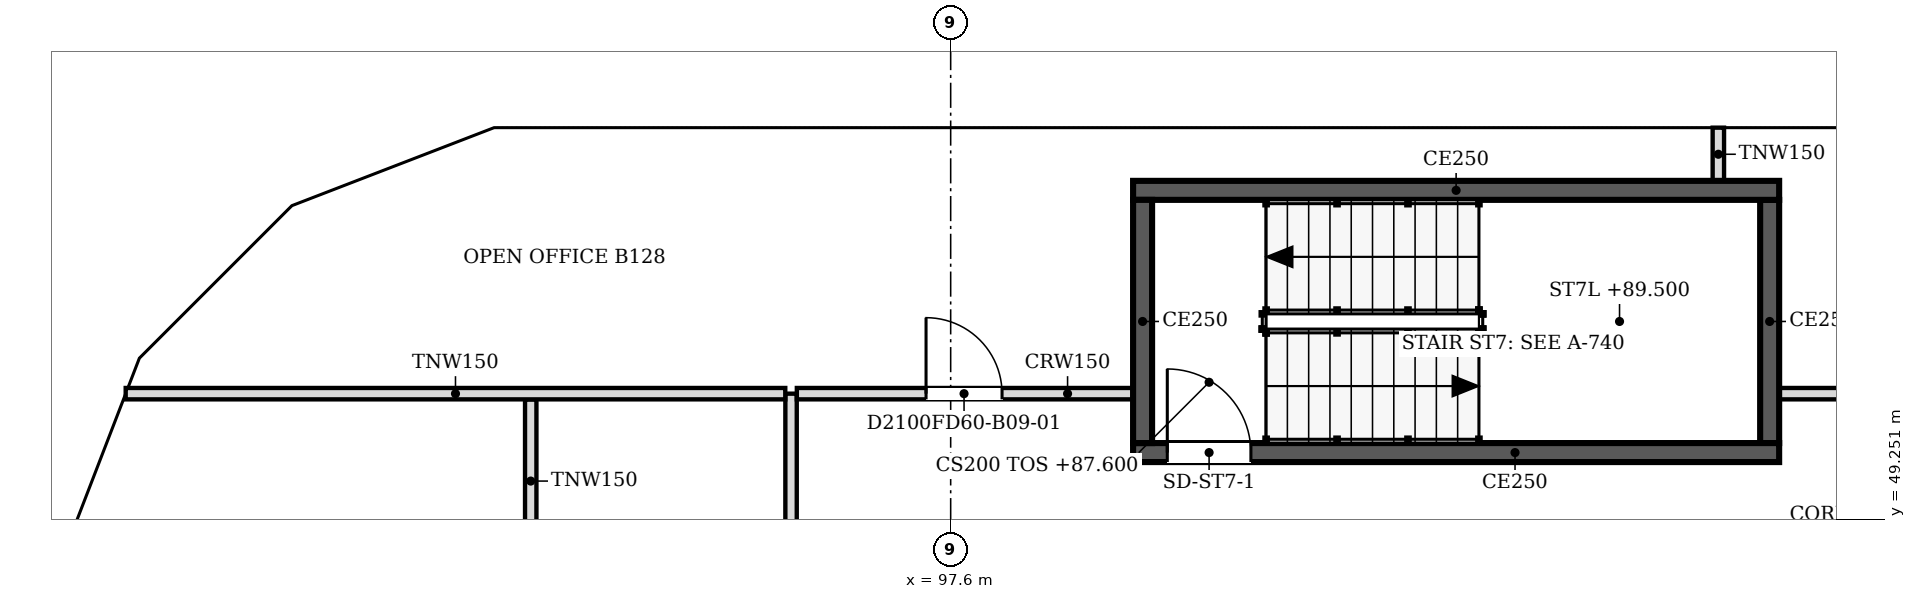
"""IFC4 building model, lengths in metres.
Left out: names, types, materials, properties, quantities, classifications, styles, units other than length and angle.
Written with IfcOpenShell. Run it as: python <this file> out.ifc"""

import sys

from ifc_helpers import new_model, si_unit, direction, frame, frame_2d, origin, place, context, subcontext, project, spatial, polyline, rectangle, outline, extrude, faceted_brep, source, transform, mapped, element, fill, save


model = new_model("IFC4")
c1 = context("Model", 3, precision=1e-05, world=origin(), true_north=direction((0.0, 1.0)))
c2 = subcontext(c1, "Body", "Model", "MODEL_VIEW")
j1 = project(units=[si_unit("LENGTHUNIT", "METRE"), si_unit("PLANEANGLEUNIT", "RADIAN")], contexts=[c1])
p1 = place(None, origin())
s1 = spatial("IfcSite", under=j1, at=p1, CompositionType="ELEMENT")
p2 = place(p1, origin())
s2 = spatial("IfcBuilding", under=s1, at=p2, CompositionType="ELEMENT")
p3 = place(p2, frame((0.0, 0.0, 87.6)))
s3 = spatial("IfcBuildingStorey", under=s2, at=p3, CompositionType="ELEMENT", Elevation=87.6)
m1 = source(origin(), c2, "Body", "SweptSolid", [
    extrude(outline(polyline([(3.05, 0.0), (6.1, 3.8), (3.05, 7.6), (0.0, 3.8), (3.05, 0.0)])), frame((0.0, 0.25, 0.0), z_axis=(0.0, -1.0, 0.0), x_axis=(1.0, 0.0, 0.0)), (0.0, 0.0, 1.0), 0.5),
])
p4 = place(p3, frame((109.8, 54.65, -3.8), z_axis=(0.0, 0.0, 1.0), x_axis=(-1.0, 0.0, 0.0)))
e1 = element("IfcWall", 1, at=p4, inside=s3, PredefinedType="SOLIDWALL", context=c2, shape_type="MappedRepresentation", body=[
    mapped(m1, transform((0.0, 0.0, 0.0), scale=1.0)),
])
m2 = source(origin(), c2, "Body", "SweptSolid", [
    extrude(outline(polyline([(3.05, 0.399), (5.78, 3.8), (3.05, 7.2), (0.321, 3.8), (3.05, 0.399)])), frame((0.0, 0.26, 0.0), z_axis=(0.0, -1.0, 0.0), x_axis=(1.0, 0.0, 0.0)), (0.0, 0.0, 1.0), 0.52),
])
p5 = place(p4, origin())
e2 = element("IfcOpeningElement", 2, at=p5, cuts=e1, PredefinedType="OPENING", context=c2, shape_type="MappedRepresentation", body=[
    mapped(m2, transform((0.0, 0.0, 0.0), scale=1.0)),
])
m3 = source(origin(), c2, "Body", "Brep", [
    faceted_brep([(3.05, -0.25, 0.0), (6.1, -0.25, 3.8), (6.1, -0.25, 3.8), (3.05, -0.25, 7.6), (0.0, -0.25, 3.8), (0.0, 0.25, 3.8), (3.05, 0.25, 7.6), (6.1, 0.25, 3.8), (6.1, 0.25, 3.8), (3.05, 0.25, 0.0)], [[[0, 1, 2, 3, 4]], [[5, 6, 7, 8, 9]], [[9, 8, 1, 0]], [[7, 6, 3, 2]], [[6, 5, 4, 3]], [[5, 9, 0, 4]], [[1, 8, 7, 2]]]),
])
p6 = place(p3, frame((103.7, 54.65, -3.8), z_axis=(0.0, 0.0, 1.0), x_axis=(-1.0, 0.0, 0.0)))
e3 = element("IfcWall", 3, at=p6, inside=s3, PredefinedType="SOLIDWALL", context=c2, shape_type="MappedRepresentation", body=[
    mapped(m3, transform((0.0, 0.0, 0.0), scale=1.0)),
])
p7 = place(p6, origin())
e4 = element("IfcOpeningElement", 4, at=p7, cuts=e3, PredefinedType="OPENING", context=c2, shape_type="MappedRepresentation", body=[
    mapped(m2, transform((0.0, 0.0, 0.0), scale=1.0)),
])
m4 = source(origin(), c2, "Body", "Brep", [
    faceted_brep([(3.05, -0.25, 0.0), (6.053, -0.25, 3.8), (3.05, -0.25, 7.6), (0.0, -0.25, 3.8), (0.0, 0.25, 3.8), (3.05, 0.25, 7.6), (6.007, 0.25, 3.859), (6.007, 0.25, 3.741), (3.05, 0.25, 0.0), (6.053, 0.0, 3.8)], [[[0, 1, 2, 3]], [[4, 5, 6, 7, 8]], [[8, 7, 9, 1, 0]], [[6, 5, 2, 1, 9]], [[5, 4, 3, 2]], [[4, 8, 0, 3]], [[7, 6, 9]]]),
])
p8 = place(p3, frame((97.6, 54.65, -3.8), z_axis=(0.0, 0.0, 1.0), x_axis=(-1.0, 0.0, 0.0)))
e5 = element("IfcWall", 5, at=p8, inside=s3, PredefinedType="SOLIDWALL", context=c2, shape_type="MappedRepresentation", body=[
    mapped(m4, transform((0.0, 0.0, 0.0), scale=1.0)),
])
m5 = source(origin(), c2, "Body", "SweptSolid", [
    extrude(outline(polyline([(3.049, 0.401), (5.735, 3.8), (3.049, 7.199), (0.321, 3.8), (3.049, 0.401)])), frame((0.0, 0.26, 0.0), z_axis=(0.0, -1.0, 0.0), x_axis=(1.0, 0.0, 0.0)), (0.0, 0.0, 1.0), 0.52),
])
p9 = place(p8, origin())
e6 = element("IfcOpeningElement", 6, at=p9, cuts=e5, PredefinedType="OPENING", context=c2, shape_type="MappedRepresentation", body=[
    mapped(m5, transform((0.0, 0.0, 0.0), scale=1.0)),
])
m6 = source(origin(), c2, "Body", "Brep", [
    faceted_brep([(2.95, -0.25, 0.0), (3.003, -0.25, 0.068), (3.003, -0.25, 7.531), (2.95, -0.25, 7.6), (0.0, -0.25, 3.8), (0.047, 0.25, 3.86), (2.898, 0.25, 7.532), (2.898, 0.25, 0.068), (0.047, 0.25, 3.74), (2.95, 0.0, 0.0), (2.95, 0.0, 7.6), (0.0, 0.0, 3.8)], [[[0, 1, 2, 3, 4]], [[5, 6, 7, 8]], [[1, 0, 9]], [[10, 3, 2]], [[6, 5, 11, 4, 3, 10]], [[8, 7, 9, 0, 4, 11]], [[8, 11, 5]], [[1, 9, 7, 6, 10, 2]]]),
])
p10 = place(p3, frame((91.547, 54.65, -3.8), z_axis=(0.0, 0.0, 1.0), x_axis=(-0.933007896601, -0.359855894603, 0.0)))
e7 = element("IfcWall", 7, at=p10, inside=s3, PredefinedType="SOLIDWALL", context=c2, shape_type="MappedRepresentation", body=[
    mapped(m6, transform((0.0, 0.0, 0.0), scale=1.0)),
])
m7 = source(origin(), c2, "Body", "SweptSolid", [
    extrude(outline(polyline([(2.75, 6.935), (0.316, 3.8), (2.75, 0.665), (2.75, 6.935)])), frame((0.0, 0.26, 0.0), z_axis=(0.0, -1.0, 0.0), x_axis=(1.0, 0.0, 0.0)), (0.0, 0.0, 1.0), 0.52),
])
p11 = place(p10, origin())
e8 = element("IfcOpeningElement", 8, at=p11, cuts=e7, PredefinedType="OPENING", context=c2, shape_type="MappedRepresentation", body=[
    mapped(m7, transform((0.0, 0.0, 0.0), scale=1.0)),
])
m8 = source(origin(), c2, "Body", "Brep", [
    faceted_brep([(0.053, -0.25, 0.0), (2.997, -0.25, 3.8), (0.053, -0.25, 7.6), (0.0, -0.25, 7.532), (0.0, -0.25, 0.068), (0.106, 0.25, 7.531), (2.944, 0.25, 3.868), (2.944, 0.25, 3.732), (0.106, 0.25, 0.068), (2.997, 0.0, 3.8), (0.053, 0.0, 0.0), (0.053, 0.0, 7.6)], [[[0, 1, 2, 3, 4]], [[5, 6, 7, 8]], [[8, 7, 9, 1, 0, 10]], [[6, 5, 11, 2, 1, 9]], [[3, 2, 11]], [[10, 0, 4]], [[8, 10, 4, 3, 11, 5]], [[7, 6, 9]]]),
])
p12 = place(p3, frame((88.831, 53.625, -3.8), z_axis=(0.0, 0.0, 1.0), x_axis=(-0.707147509625, -0.707066050402, 0.0)))
e9 = element("IfcWall", 9, at=p12, inside=s3, PredefinedType="SOLIDWALL", context=c2, shape_type="MappedRepresentation", body=[
    mapped(m8, transform((0.0, 0.0, 0.0), scale=1.0)),
])
m9 = source(origin(), c2, "Body", "SweptSolid", [
    extrude(outline(polyline([(0.253, 0.666), (2.681, 3.8), (0.253, 6.934), (0.253, 0.666)])), frame((0.0, 0.26, 0.0), z_axis=(0.0, -1.0, 0.0), x_axis=(1.0, 0.0, 0.0)), (0.0, 0.0, 1.0), 0.52),
])
p13 = place(p12, origin())
e10 = element("IfcOpeningElement", 10, at=p13, cuts=e9, PredefinedType="OPENING", context=c2, shape_type="MappedRepresentation", body=[
    mapped(m9, transform((0.0, 0.0, 0.0), scale=1.0)),
])
m10 = source(origin(), c2, "Body", "Brep", [
    faceted_brep([(2.95, -0.25, 0.0), (2.997, -0.25, 0.059), (2.997, -0.25, 7.541), (2.95, -0.25, 7.6), (0.0, -0.25, 3.8), (0.053, 0.25, 3.868), (2.904, 0.25, 7.54), (2.904, 0.25, 0.06), (0.053, 0.25, 3.732), (2.95, 0.0, 0.0), (2.95, 0.0, 7.6), (0.0, 0.0, 3.8)], [[[0, 1, 2, 3, 4]], [[5, 6, 7, 8]], [[1, 0, 9]], [[10, 3, 2]], [[6, 5, 11, 4, 3, 10]], [[8, 7, 9, 0, 4, 11]], [[8, 11, 5]], [[1, 9, 7, 6, 10, 2]]]),
])
p14 = place(p3, frame((86.712, 51.506, -3.8), z_axis=(0.0, 0.0, 1.0), x_axis=(-0.359874094142, -0.933000876937, 0.0)))
e11 = element("IfcWall", 11, at=p14, inside=s3, PredefinedType="SOLIDWALL", context=c2, shape_type="MappedRepresentation", body=[
    mapped(m10, transform((0.0, 0.0, 0.0), scale=1.0)),
])
p15 = place(p14, origin())
e12 = element("IfcOpeningElement", 12, at=p15, cuts=e11, PredefinedType="OPENING", context=c2, shape_type="MappedRepresentation", body=[
    mapped(m7, transform((0.0, 0.0, 0.0), scale=1.0)),
])
p16 = place(p2, frame((0.0, 0.0, 91.4)))
s4 = spatial("IfcBuildingStorey", under=s2, at=p16, CompositionType="ELEMENT", Elevation=91.4)
m11 = source(origin(), c2, "Body", "SweptSolid", [
    extrude(outline(polyline([(3.05, 0.0), (6.1, 3.8), (3.05, 7.6), (0.0, 3.8), (3.05, 0.0)])), frame((0.0, 0.25, 0.0), z_axis=(0.0, -1.0, 0.0), x_axis=(1.0, 0.0, 0.0)), (0.0, 0.0, 1.0), 0.5),
])
p17 = place(p16, frame((112.85, 54.65, -3.8), z_axis=(0.0, 0.0, 1.0), x_axis=(-1.0, 0.0, 0.0)))
e13 = element("IfcWall", 13, at=p17, inside=s4, PredefinedType="SOLIDWALL", context=c2, shape_type="MappedRepresentation", body=[
    mapped(m11, transform((0.0, 0.0, 0.0), scale=1.0)),
])
m12 = source(origin(), c2, "Body", "SweptSolid", [
    extrude(outline(polyline([(3.05, 0.399), (5.78, 3.8), (3.05, 7.2), (0.321, 3.8), (3.05, 0.399)])), frame((0.0, 0.26, 0.0), z_axis=(0.0, -1.0, 0.0), x_axis=(1.0, 0.0, 0.0)), (0.0, 0.0, 1.0), 0.52),
])
p18 = place(p17, origin())
e14 = element("IfcOpeningElement", 14, at=p18, cuts=e13, PredefinedType="OPENING", context=c2, shape_type="MappedRepresentation", body=[
    mapped(m12, transform((0.0, 0.0, 0.0), scale=1.0)),
])
p19 = place(p16, frame((106.75, 54.65, -3.8), z_axis=(0.0, 0.0, 1.0), x_axis=(-1.0, 0.0, 0.0)))
e15 = element("IfcWall", 15, at=p19, inside=s4, PredefinedType="SOLIDWALL", context=c2, shape_type="MappedRepresentation", body=[
    mapped(m11, transform((0.0, 0.0, 0.0), scale=1.0)),
])
p20 = place(p19, origin())
e16 = element("IfcOpeningElement", 16, at=p20, cuts=e15, PredefinedType="OPENING", context=c2, shape_type="MappedRepresentation", body=[
    mapped(m12, transform((0.0, 0.0, 0.0), scale=1.0)),
])
m13 = source(origin(), c2, "Body", "Brep", [
    faceted_brep([(3.05, -0.25, 0.0), (6.1, -0.25, 3.8), (6.1, -0.25, 3.8), (3.05, -0.25, 7.6), (0.0, -0.25, 3.8), (0.0, 0.25, 3.8), (3.05, 0.25, 7.6), (6.1, 0.25, 3.8), (6.1, 0.25, 3.8), (3.05, 0.25, 0.0)], [[[0, 1, 2, 3, 4]], [[5, 6, 7, 8, 9]], [[9, 8, 1, 0]], [[7, 6, 3, 2]], [[6, 5, 4, 3]], [[5, 9, 0, 4]], [[1, 8, 7, 2]]]),
])
p21 = place(p16, frame((100.65, 54.65, -3.8), z_axis=(0.0, 0.0, 1.0), x_axis=(-1.0, 0.0, 0.0)))
e17 = element("IfcWall", 17, at=p21, inside=s4, PredefinedType="SOLIDWALL", context=c2, shape_type="MappedRepresentation", body=[
    mapped(m13, transform((0.0, 0.0, 0.0), scale=1.0)),
])
p22 = place(p21, origin())
e18 = element("IfcOpeningElement", 18, at=p22, cuts=e17, PredefinedType="OPENING", context=c2, shape_type="MappedRepresentation", body=[
    mapped(m12, transform((0.0, 0.0, 0.0), scale=1.0)),
])
m14 = source(origin(), c2, "Body", "Brep", [
    faceted_brep([(3.003, -0.25, 0.0), (3.05, -0.25, 0.06), (3.05, -0.25, 7.54), (3.003, -0.25, 7.6), (0.0, -0.25, 3.8), (0.0, 0.25, 3.8), (2.957, 0.25, 7.541), (2.957, 0.25, 0.059), (3.003, 0.0, 0.0), (3.003, 0.0, 7.6)], [[[0, 1, 2, 3, 4]], [[5, 6, 7]], [[1, 0, 8]], [[9, 3, 2]], [[6, 5, 4, 3, 9]], [[5, 7, 8, 0, 4]], [[1, 8, 7, 6, 9, 2]]]),
])
p23 = place(p16, frame((94.55, 54.65, -3.8), z_axis=(0.0, 0.0, 1.0), x_axis=(-1.0, 0.0, 0.0)))
e19 = element("IfcWall", 19, at=p23, inside=s4, PredefinedType="SOLIDWALL", context=c2, shape_type="MappedRepresentation", body=[
    mapped(m14, transform((0.0, 0.0, 0.0), scale=1.0)),
])
m15 = source(origin(), c2, "Body", "SweptSolid", [
    extrude(outline(polyline([(2.803, 6.944), (0.319, 3.8), (2.803, 0.656), (2.803, 6.944)])), frame((0.0, 0.26, 0.0), z_axis=(0.0, -1.0, 0.0), x_axis=(1.0, 0.0, 0.0)), (0.0, 0.0, 1.0), 0.52),
])
p24 = place(p23, origin())
e20 = element("IfcOpeningElement", 20, at=p24, cuts=e19, PredefinedType="OPENING", context=c2, shape_type="MappedRepresentation", body=[
    mapped(m15, transform((0.0, 0.0, 0.0), scale=1.0)),
])
m16 = source(origin(), c2, "Body", "Brep", [
    faceted_brep([(0.047, -0.25, 0.0), (2.997, -0.25, 3.8), (0.047, -0.25, 7.6), (0.0, -0.25, 7.541), (0.0, -0.25, 0.059), (0.093, 0.25, 7.54), (2.944, 0.25, 3.868), (2.944, 0.25, 3.732), (0.093, 0.25, 0.06), (2.997, 0.0, 3.8), (0.047, 0.0, 0.0), (0.047, 0.0, 7.6)], [[[0, 1, 2, 3, 4]], [[5, 6, 7, 8]], [[8, 7, 9, 1, 0, 10]], [[6, 5, 11, 2, 1, 9]], [[3, 2, 11]], [[10, 0, 4]], [[8, 10, 4, 3, 11, 5]], [[9, 7, 6]]]),
])
p25 = place(p16, frame((91.59, 54.667, -3.8), z_axis=(0.0, 0.0, 1.0), x_axis=(-0.933000876937, -0.359874094142, 0.0)))
e21 = element("IfcWall", 21, at=p25, inside=s4, PredefinedType="SOLIDWALL", context=c2, shape_type="MappedRepresentation", body=[
    mapped(m16, transform((0.0, 0.0, 0.0), scale=1.0)),
])
m17 = source(origin(), c2, "Body", "SweptSolid", [
    extrude(outline(polyline([(0.247, 0.665), (2.681, 3.8), (0.247, 6.935), (0.247, 0.665)])), frame((0.0, 0.26, 0.0), z_axis=(0.0, -1.0, 0.0), x_axis=(1.0, 0.0, 0.0)), (0.0, 0.0, 1.0), 0.52),
])
p26 = place(p25, origin())
e22 = element("IfcOpeningElement", 22, at=p26, cuts=e21, PredefinedType="OPENING", context=c2, shape_type="MappedRepresentation", body=[
    mapped(m17, transform((0.0, 0.0, 0.0), scale=1.0)),
])
m18 = source(origin(), c2, "Body", "Brep", [
    faceted_brep([(2.944, -0.25, 0.0), (2.997, -0.25, 0.068), (2.997, -0.25, 7.532), (2.944, -0.25, 7.6), (0.0, -0.25, 3.8), (0.053, 0.25, 3.868), (2.891, 0.25, 7.532), (2.891, 0.25, 0.068), (0.053, 0.25, 3.731), (2.944, 0.0, 0.0), (2.944, 0.0, 7.6), (0.0, 0.0, 3.8)], [[[0, 1, 2, 3, 4]], [[5, 6, 7, 8]], [[1, 0, 9]], [[10, 3, 2]], [[6, 5, 11, 4, 3, 10]], [[8, 7, 9, 0, 4, 11]], [[8, 11, 5]], [[1, 9, 7, 6, 10, 2]]]),
])
p27 = place(p16, frame((88.794, 53.588, -3.8), z_axis=(0.0, 0.0, 1.0), x_axis=(-0.707066050402, -0.707147509625, 0.0)))
e23 = element("IfcWall", 23, at=p27, inside=s4, PredefinedType="SOLIDWALL", context=c2, shape_type="MappedRepresentation", body=[
    mapped(m18, transform((0.0, 0.0, 0.0), scale=1.0)),
])
m19 = source(origin(), c2, "Body", "SweptSolid", [
    extrude(outline(polyline([(2.744, 6.934), (0.316, 3.8), (2.744, 0.666), (2.744, 6.934)])), frame((0.0, 0.26, 0.0), z_axis=(0.0, -1.0, 0.0), x_axis=(1.0, 0.0, 0.0)), (0.0, 0.0, 1.0), 0.52),
])
p28 = place(p27, origin())
e24 = element("IfcOpeningElement", 24, at=p28, cuts=e23, PredefinedType="OPENING", context=c2, shape_type="MappedRepresentation", body=[
    mapped(m19, transform((0.0, 0.0, 0.0), scale=1.0)),
])
m20 = source(origin(), c2, "Body", "Brep", [
    faceted_brep([(0.053, -0.25, 0.0), (3.003, -0.25, 3.8), (0.053, -0.25, 7.6), (0.0, -0.25, 7.531), (0.0, -0.25, 0.068), (0.106, 0.25, 7.532), (2.957, 0.25, 3.86), (2.957, 0.25, 3.74), (0.106, 0.25, 0.068), (3.003, 0.0, 3.8), (0.053, 0.0, 0.0), (0.053, 0.0, 7.6)], [[[0, 1, 2, 3, 4]], [[5, 6, 7, 8]], [[8, 7, 9, 1, 0, 10]], [[6, 5, 11, 2, 1, 9]], [[3, 2, 11]], [[10, 0, 4]], [[8, 10, 4, 3, 11, 5]], [[9, 7, 6]]]),
])
p29 = place(p16, frame((86.731, 51.556, -3.8), z_axis=(0.0, 0.0, 1.0), x_axis=(-0.359855894603, -0.933007896601, 0.0)))
e25 = element("IfcWall", 25, at=p29, inside=s4, PredefinedType="SOLIDWALL", context=c2, shape_type="MappedRepresentation", body=[
    mapped(m20, transform((0.0, 0.0, 0.0), scale=1.0)),
])
m21 = source(origin(), c2, "Body", "SweptSolid", [
    extrude(outline(polyline([(0.253, 0.665), (2.687, 3.8), (0.253, 6.935), (0.253, 0.665)])), frame((0.0, 0.26, 0.0), z_axis=(0.0, -1.0, 0.0), x_axis=(1.0, 0.0, 0.0)), (0.0, 0.0, 1.0), 0.52),
])
p30 = place(p29, origin())
e26 = element("IfcOpeningElement", 26, at=p30, cuts=e25, PredefinedType="OPENING", context=c2, shape_type="MappedRepresentation", body=[
    mapped(m21, transform((0.0, 0.0, 0.0), scale=1.0)),
])
p31 = place(p3, frame((108.5, 50.125, 0.0), z_axis=(0.0, 0.0, 1.0), x_axis=(-1.0, 0.0, 0.0)))
e27 = element("IfcWall", 27, at=p31, inside=s3, PredefinedType="SOLIDWALL", context=c2, shape_type="SweptSolid", body=[
    extrude(rectangle(XDim=8.5, YDim=0.25, at=frame_2d((4.25, 0.0))), origin(), (0.0, 0.0, 1.0), 3.8),
])
m22 = source(origin(), c2, "Body", "SweptSolid", [
    extrude(rectangle(XDim=1.1, YDim=2.1, at=frame_2d((0.55, 1.05))), frame((0.0, 0.135, 0.0), z_axis=(0.0, -1.0, 0.0), x_axis=(1.0, 0.0, 0.0)), (0.0, 0.0, 1.0), 0.27),
])
p32 = place(p31, frame((6.95, 0.0, 0.0)))
e28 = element("IfcOpeningElement", 28, at=p32, cuts=e27, PredefinedType="OPENING", context=c2, shape_type="MappedRepresentation", body=[
    mapped(m22, transform((0.0, 0.0, 0.0), scale=1.0)),
])
p33 = place(p3, frame((100.125, 50.25, 0.0), z_axis=(0.0, 0.0, 1.0), x_axis=(0.0, 1.0, 0.0)))
e29 = element("IfcWall", 29, at=p33, inside=s3, PredefinedType="SOLIDWALL", context=c2, shape_type="SweptSolid", body=[
    extrude(rectangle(XDim=3.2, YDim=0.25, at=frame_2d((1.6, 0.0))), origin(), (0.0, 0.0, 1.0), 3.8),
])
p34 = place(p3, frame((100.0, 53.575, 0.0), z_axis=(0.0, 0.0, 1.0), x_axis=(1.0, 0.0, 0.0)))
e30 = element("IfcWall", 30, at=p34, inside=s3, PredefinedType="SOLIDWALL", context=c2, shape_type="SweptSolid", body=[
    extrude(rectangle(XDim=8.5, YDim=0.25, at=frame_2d((4.25, 0.0))), origin(), (0.0, 0.0, 1.0), 3.8),
])
p35 = place(p3, frame((108.375, 53.45, 0.0), z_axis=(0.0, 0.0, 1.0), x_axis=(0.0, -1.0, 0.0)))
e31 = element("IfcWall", 31, at=p35, inside=s3, PredefinedType="SOLIDWALL", context=c2, shape_type="SweptSolid", body=[
    extrude(rectangle(XDim=3.2, YDim=0.25, at=frame_2d((1.6, 0.0))), origin(), (0.0, 0.0, 1.0), 3.8),
])
p36 = place(p3, frame((95.5, 36.6, 0.0), z_axis=(0.0, 0.0, 1.0), x_axis=(0.0, 1.0, 0.0)))
e32 = element("IfcWall", 32, at=p36, inside=s3, PredefinedType="PARTITIONING", context=c2, shape_type="SweptSolid", body=[
    extrude(rectangle(XDim=14.3, YDim=0.15, at=frame_2d((7.15, 0.0))), origin(), (0.0, 0.0, 1.0), 3.067),
])
m23 = source(origin(), c2, "Body", "SweptSolid", [
    extrude(rectangle(XDim=1.0, YDim=2.1, at=frame_2d((0.5, 1.05))), frame((0.0, 0.085, 0.0), z_axis=(0.0, -1.0, 0.0), x_axis=(1.0, 0.0, 0.0)), (0.0, 0.0, 1.0), 0.17),
])
p37 = place(p36, frame((11.101, 0.0, 0.0)))
e33 = element("IfcOpeningElement", 33, at=p37, cuts=e32, PredefinedType="OPENING", context=c2, shape_type="MappedRepresentation", body=[
    mapped(m23, transform((0.0, 0.0, 0.0), scale=1.0)),
])
p38 = place(p36, frame((4.0, 0.0, 0.0)))
e34 = element("IfcOpeningElement", 34, at=p38, cuts=e32, PredefinedType="OPENING", context=c2, shape_type="MappedRepresentation", body=[
    mapped(m23, transform((0.0, 0.0, 0.0), scale=1.0)),
])
p39 = place(p3, frame((92.075, 45.676, 0.0), z_axis=(0.0, 0.0, 1.0), x_axis=(0.0, 1.0, 0.0)))
e35 = element("IfcWall", 35, at=p39, inside=s3, PredefinedType="PARTITIONING", context=c2, shape_type="SweptSolid", body=[
    extrude(rectangle(XDim=5.148, YDim=0.15, at=frame_2d((2.574, 0.0))), origin(), (0.0, 0.0, 1.0), 3.067),
])
m24 = source(origin(), c2, "Body", "SweptSolid", [
    extrude(rectangle(XDim=0.9, YDim=2.1, at=frame_2d((0.45, 1.05))), frame((0.0, 0.085, 0.0), z_axis=(0.0, -1.0, 0.0), x_axis=(1.0, 0.0, 0.0)), (0.0, 0.0, 1.0), 0.17),
])
p40 = place(p39, frame((2.1, 0.0, 0.0)))
e36 = element("IfcOpeningElement", 36, at=p40, cuts=e35, PredefinedType="OPENING", context=c2, shape_type="MappedRepresentation", body=[
    mapped(m24, transform((0.0, 0.0, 0.0), scale=1.0)),
])
p41 = place(p3, frame((86.746, 50.9, 0.0), z_axis=(0.0, 0.0, 1.0), x_axis=(1.0, 0.0, 0.0)))
e37 = element("IfcWall", 37, at=p41, inside=s3, PredefinedType="PARTITIONING", context=c2, shape_type="SweptSolid", body=[
    extrude(rectangle(XDim=8.678, YDim=0.15, at=frame_2d((4.339, 0.0))), origin(), (0.0, 0.0, 1.0), 3.067),
])
p42 = place(p3, frame((95.576, 50.9, 0.0), z_axis=(0.0, 0.0, 1.0), x_axis=(1.0, 0.0, 0.0)))
e38 = element("IfcWall", 38, at=p42, inside=s3, PredefinedType="PARTITIONING", context=c2, shape_type="SweptSolid", body=[
    extrude(rectangle(XDim=4.424, YDim=0.15, at=frame_2d((2.212, 0.0))), origin(), (0.0, 0.0, 1.0), 3.067),
])
p43 = place(p42, frame((1.7, 0.0, 0.0)))
e39 = element("IfcOpeningElement", 39, at=p43, cuts=e38, PredefinedType="OPENING", context=c2, shape_type="MappedRepresentation", body=[
    mapped(m23, transform((0.0, 0.0, 0.0), scale=1.0)),
])
p44 = place(p3, frame((108.5, 50.9, 0.0), z_axis=(0.0, 0.0, 1.0), x_axis=(1.0, 0.0, 0.0)))
e40 = element("IfcWall", 40, at=p44, inside=s3, PredefinedType="PARTITIONING", context=c2, shape_type="SweptSolid", body=[
    extrude(rectangle(XDim=15.6, YDim=0.15, at=frame_2d((7.8, 0.0))), origin(), (0.0, 0.0, 1.0), 3.067),
])
p45 = place(p44, frame((7.3, 0.0, 0.0)))
e41 = element("IfcOpeningElement", 41, at=p45, cuts=e40, PredefinedType="OPENING", context=c2, shape_type="MappedRepresentation", body=[
    mapped(m24, transform((0.0, 0.0, 0.0), scale=1.0)),
])
p46 = place(p3, frame((107.7, 53.7, 0.0), z_axis=(0.0, 0.0, 1.0), x_axis=(0.0, 1.0, 0.0)))
e42 = element("IfcWall", 42, at=p46, inside=s3, PredefinedType="PARTITIONING", context=c2, shape_type="SweptSolid", body=[
    extrude(rectangle(XDim=0.7, YDim=0.15, at=frame_2d((0.35, 0.0))), origin(), (0.0, 0.0, 1.0), 3.067),
])
m25 = source(origin(), c2, "Body", "SweptSolid", [
    extrude(rectangle(XDim=1.1, YDim=2.1, at=frame_2d((0.55, 1.05))), frame((0.0, 0.025, 0.0), z_axis=(0.0, -1.0, 0.0), x_axis=(1.0, 0.0, 0.0)), (0.0, 0.0, 1.0), 0.05),
])
p47 = place(p32, origin())
e43 = element("IfcDoor", 43, at=p47, inside=s3, OperationType="SINGLE_SWING_RIGHT", PredefinedType="DOOR", context=c2, shape_type="MappedRepresentation", body=[
    mapped(m25, transform((0.0, 0.0, 0.0), scale=1.0)),
])
fill(e28, e43)
m26 = source(origin(), c2, "Body", "SweptSolid", [
    extrude(rectangle(XDim=1.0, YDim=2.1, at=frame_2d((0.5, 1.05))), frame((0.0, 0.025, 0.0), z_axis=(0.0, -1.0, 0.0), x_axis=(1.0, 0.0, 0.0)), (0.0, 0.0, 1.0), 0.05),
])
p48 = place(p43, origin())
e44 = element("IfcDoor", 44, at=p48, inside=s3, OperationType="SINGLE_SWING_LEFT", PredefinedType="DOOR", context=c2, shape_type="MappedRepresentation", body=[
    mapped(m26, transform((0.0, 0.0, 0.0), scale=1.0)),
])
fill(e39, e44)
save(model, sys.argv[1])
